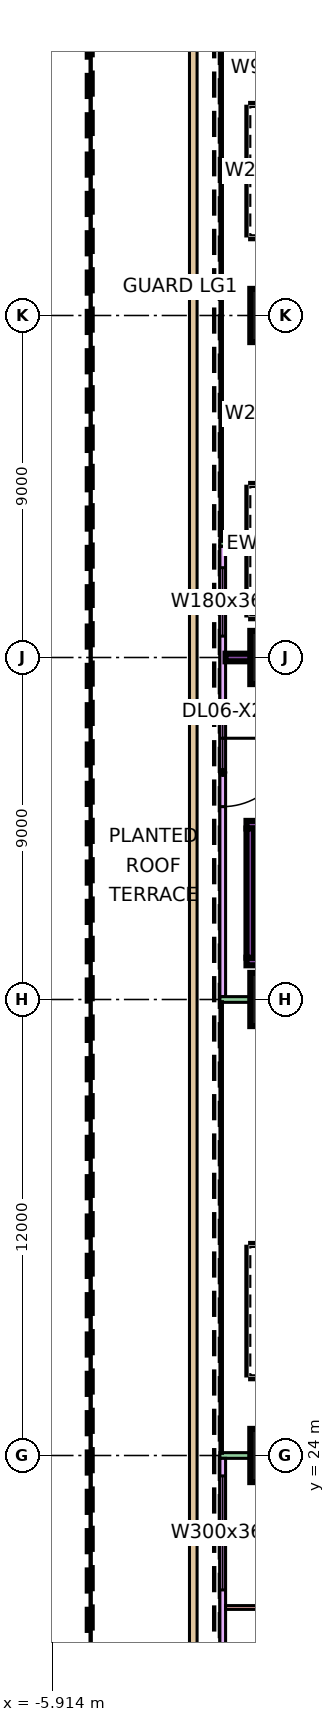
"""IFC4 building model, lengths in metres.
Left out: names, types, materials, properties, quantities, classifications, styles, units other than length and angle.
Written with IfcOpenShell. Run it as: python <this file> out.ifc"""

import sys

from ifc_helpers import new_model, si_unit, direction, frame, frame_2d, origin, origin_2d, place, context, subcontext, project, spatial, rectangle, extrude, element, fill, save


model = new_model("IFC4")
c1 = context("Model", 3, precision=1e-05, world=origin(), true_north=direction((0.0, 1.0)))
c2 = subcontext(c1, "Body", "Model", "MODEL_VIEW")
j1 = project(units=[si_unit("LENGTHUNIT", "METRE"), si_unit("PLANEANGLEUNIT", "RADIAN")], contexts=[c1])
p1 = place(None, origin())
s1 = spatial("IfcSite", under=j1, at=p1, CompositionType="ELEMENT")
p2 = place(p1, origin())
s2 = spatial("IfcBuilding", under=s1, at=p2, CompositionType="ELEMENT")
p3 = place(p2, frame((0.0, 0.0, 35.4)))
s3 = spatial("IfcBuildingStorey", under=s2, at=p3, CompositionType="ELEMENT", Elevation=35.4)
p4 = place(p3, frame((0.0, 24.0, 0.0), z_axis=(0.0, 0.0, 1.0), x_axis=(1.0, 0.0, 0.0)))
e1 = element("IfcColumn", 1, at=p4, inside=s3, PredefinedType="COLUMN", context=c2, shape_type="SweptSolid", body=[
    extrude(rectangle(XDim=1.4, YDim=1.4, at=origin_2d()), origin(), (0.0, 0.0, 1.0), 6.0),
])
p5 = place(p3, frame((0.0, 36.0, 0.0), z_axis=(0.0, 0.0, 1.0), x_axis=(1.0, 0.0, 0.0)))
e2 = element("IfcColumn", 2, at=p5, inside=s3, PredefinedType="COLUMN", context=c2, shape_type="SweptSolid", body=[
    extrude(rectangle(XDim=1.4, YDim=1.4, at=origin_2d()), origin(), (0.0, 0.0, 1.0), 6.0),
])
for number, where, z_axis, x_axis in (
    (3, (0.0, 45.0, 0.0), (0.0, 0.0, 1.0), (1.0, 0.0, 0.0)),
    (4, (0.0, 54.0, 0.0), (0.0, 0.0, 1.0), (1.0, 0.0, 0.0)),
):
    element("IfcColumn", number, at=place(p3, frame(where, z_axis=z_axis, x_axis=x_axis)), inside=s3, PredefinedType="COLUMN", context=c2, shape_type="SweptSolid", body=[
        extrude(rectangle(XDim=1.4, YDim=1.4, at=origin_2d()), origin(), (0.0, 0.0, 1.0), 6.0),
    ])
p6 = place(p3, frame((-1.5, 48.0, 0.0), z_axis=(0.0, 0.0, 1.0), x_axis=(1.0, 0.0, 0.0)))
e5 = element("IfcWall", 5, at=p6, inside=s3, PredefinedType="SOLIDWALL", context=c2, shape_type="SweptSolid", body=[
    extrude(rectangle(XDim=1.5, YDim=0.15, at=frame_2d((0.75, 0.0))), origin(), (0.0, 0.0, 1.0), 5.6),
])
p7 = place(p3, frame((-1.425, 47.925, 0.0), z_axis=(0.0, 0.0, 1.0), x_axis=(0.0, -1.0, 0.0)))
e6 = element("IfcWall", 6, at=p7, inside=s3, PredefinedType="SOLIDWALL", context=c2, shape_type="SweptSolid", body=[
    extrude(rectangle(XDim=11.85, YDim=0.15, at=frame_2d((5.925, 0.0))), origin(), (0.0, 0.0, 1.0), 5.6),
])
p8 = place(p7, frame((0.562, 0.0, 0.45)))
e7 = element("IfcOpeningElement", 7, at=p8, cuts=e6, PredefinedType="OPENING", context=c2, shape_type="SweptSolid", body=[
    extrude(rectangle(XDim=1.8, YDim=3.6, at=frame_2d((0.9, 1.8))), frame((0.0, 0.085, 0.0), z_axis=(0.0, -1.0, 0.0), x_axis=(1.0, 0.0, 0.0)), (0.0, 0.0, 1.0), 0.17),
])
p9 = place(p7, frame((5.05, 0.0, 0.0)))
e8 = element("IfcOpeningElement", 8, at=p9, cuts=e6, PredefinedType="OPENING", context=c2, shape_type="SweptSolid", body=[
    extrude(rectangle(XDim=1.8, YDim=2.4, at=frame_2d((0.9, 1.2))), frame((0.0, 0.085, 0.0), z_axis=(0.0, -1.0, 0.0), x_axis=(1.0, 0.0, 0.0)), (0.0, 0.0, 1.0), 0.17),
])
for number, where, z_axis, x_axis in (
    (9, (-1.5, 36.0, 0.0), (0.0, 0.0, 1.0), (1.0, 0.0, 0.0)),
    (10, (-1.5, 24.0, 0.0), (0.0, 0.0, 1.0), (1.0, 0.0, 0.0)),
):
    element("IfcWall", number, at=place(p3, frame(where, z_axis=z_axis, x_axis=x_axis)), inside=s3, PredefinedType="SOLIDWALL", context=c2, shape_type="SweptSolid", body=[
        extrude(rectangle(XDim=1.5, YDim=0.15, at=frame_2d((0.75, 0.0))), origin(), (0.0, 0.0, 1.0), 5.6),
    ])
p10 = place(p3, frame((-1.425, 23.925, 0.0), z_axis=(0.0, 0.0, 1.0), x_axis=(0.0, -1.0, 0.0)))
e11 = element("IfcWall", 11, at=p10, inside=s3, PredefinedType="SOLIDWALL", context=c2, shape_type="SweptSolid", body=[
    extrude(rectangle(XDim=11.425, YDim=0.15, at=frame_2d((5.712, 0.0))), origin(), (0.0, 0.0, 1.0), 5.6),
])
p11 = place(p10, frame((0.462, 0.0, 0.45)))
e12 = element("IfcOpeningElement", 12, at=p11, cuts=e11, PredefinedType="OPENING", context=c2, shape_type="SweptSolid", body=[
    extrude(rectangle(XDim=3.0, YDim=3.6, at=frame_2d((1.5, 1.8))), frame((0.0, 0.085, 0.0), z_axis=(0.0, -1.0, 0.0), x_axis=(1.0, 0.0, 0.0)), (0.0, 0.0, 1.0), 0.17),
])
p12 = place(p10, frame((6.175, 0.0, 0.45)))
e13 = element("IfcOpeningElement", 13, at=p12, cuts=e11, PredefinedType="OPENING", context=c2, shape_type="SweptSolid", body=[
    extrude(rectangle(XDim=3.0, YDim=3.6, at=frame_2d((1.5, 1.8))), frame((0.0, 0.085, 0.0), z_axis=(0.0, -1.0, 0.0), x_axis=(1.0, 0.0, 0.0)), (0.0, 0.0, 1.0), 0.17),
])
p13 = place(p3, frame((-2.2, 12.21, 0.0), z_axis=(0.0, 0.0, 1.0), x_axis=(0.0, 1.0, 0.0)))
e14 = element("IfcWall", 14, at=p13, inside=s3, PredefinedType="PARAPET", context=c2, shape_type="SweptSolid", body=[
    extrude(rectangle(XDim=49.58, YDim=0.2, at=frame_2d((24.79, 0.0))), origin(), (0.0, 0.0, 1.0), 0.5),
])
p14 = place(p3, frame((-1.351, 20.0, 0.0), z_axis=(0.0, 0.0, 1.0), x_axis=(1.0, 0.0, 0.0)))
e15 = element("IfcWall", 15, at=p14, inside=s3, PredefinedType="PARTITIONING", context=c2, shape_type="SweptSolid", body=[
    extrude(rectangle(XDim=3.451, YDim=0.1, at=frame_2d((1.726, 0.0))), origin(), (0.0, 0.0, 1.0), 5.6),
])
p15 = place(p3, frame((-1.351, 45.0, 0.0), z_axis=(0.0, 0.0, 1.0), x_axis=(1.0, 0.0, 0.0)))
e16 = element("IfcWall", 16, at=p15, inside=s3, PredefinedType="SOLIDWALL", context=c2, shape_type="SweptSolid", body=[
    extrude(rectangle(XDim=13.851, YDim=0.2, at=frame_2d((6.926, 0.0))), origin(), (0.0, 0.0, 1.0), 5.6),
])
for number, where, z_axis, x_axis in (
    (17, (-0.8, 37.0, 0.0), (0.0, 0.0, 1.0), (1.0, 0.0, 0.0)),
    (18, (-0.8, 40.6, 0.0), (0.0, 0.0, 1.0), (1.0, 0.0, 0.0)),
):
    element("IfcWall", number, at=place(p3, frame(where, z_axis=z_axis, x_axis=x_axis)), inside=s3, PredefinedType="SOLIDWALL", context=c2, shape_type="SweptSolid", body=[
        extrude(rectangle(XDim=13.3, YDim=0.2, at=frame_2d((6.65, 0.0))), origin(), (0.0, 0.0, 1.0), 5.6),
    ])
p16 = place(p3, frame((-0.7, 37.1, 0.0), z_axis=(0.0, 0.0, 1.0), x_axis=(0.0, 1.0, 0.0)))
e19 = element("IfcWall", 19, at=p16, inside=s3, PredefinedType="SOLIDWALL", context=c2, shape_type="SweptSolid", body=[
    extrude(rectangle(XDim=3.4, YDim=0.2, at=frame_2d((1.7, 0.0))), origin(), (0.0, 0.0, 1.0), 5.6),
])
p17 = place(p8, origin())
e20 = element("IfcWindow", 20, at=p17, inside=s3, PartitioningType="SINGLE_PANEL", PredefinedType="WINDOW", context=c2, shape_type="SweptSolid", body=[
    extrude(rectangle(XDim=1.8, YDim=3.6, at=frame_2d((0.9, 1.8))), frame((0.0, 0.03, 0.0), z_axis=(0.0, -1.0, 0.0), x_axis=(1.0, 0.0, 0.0)), (0.0, 0.0, 1.0), 0.06),
])
fill(e7, e20)
p18 = place(p11, origin())
e21 = element("IfcWindow", 21, at=p18, inside=s3, PartitioningType="SINGLE_PANEL", PredefinedType="WINDOW", context=c2, shape_type="SweptSolid", body=[
    extrude(rectangle(XDim=3.0, YDim=3.6, at=frame_2d((1.5, 1.8))), frame((0.0, 0.03, 0.0), z_axis=(0.0, -1.0, 0.0), x_axis=(1.0, 0.0, 0.0)), (0.0, 0.0, 1.0), 0.06),
])
fill(e12, e21)
p19 = place(p9, origin())
e22 = element("IfcDoor", 22, at=p19, inside=s3, OperationType="DOUBLE_DOOR_SINGLE_SWING", PredefinedType="DOOR", context=c2, shape_type="SweptSolid", body=[
    extrude(rectangle(XDim=1.8, YDim=2.4, at=frame_2d((0.9, 1.2))), frame((0.0, 0.025, 0.0), z_axis=(0.0, -1.0, 0.0), x_axis=(1.0, 0.0, 0.0)), (0.0, 0.0, 1.0), 0.05),
])
fill(e8, e22)
save(model, sys.argv[1])
